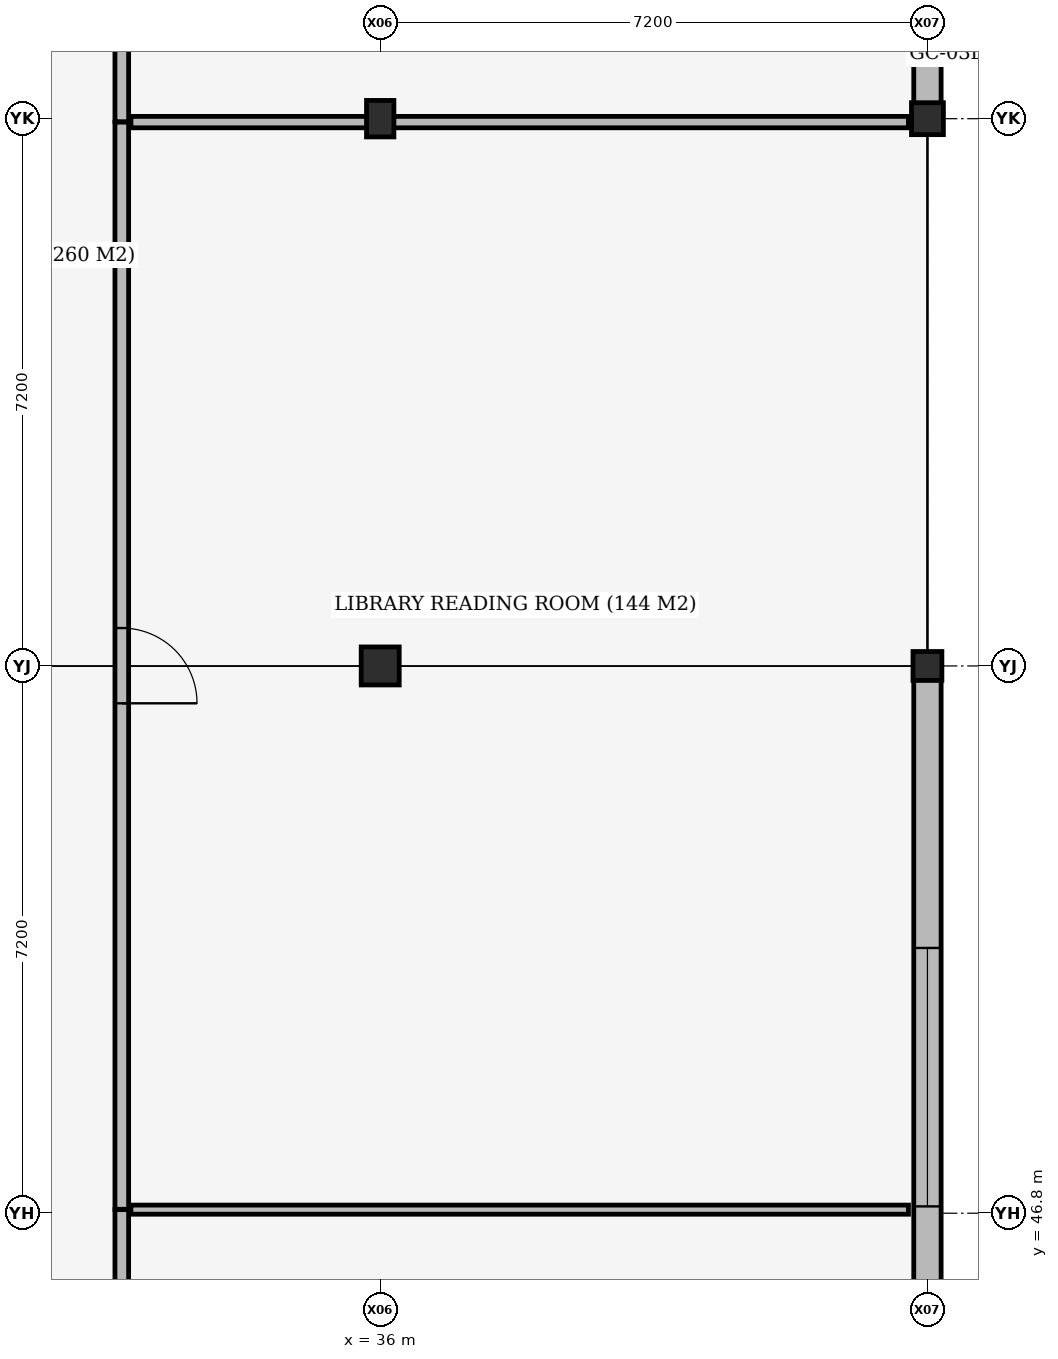
"""IFC4 building model, lengths in metres.
Left out: names, types, materials, properties, quantities, classifications, styles, units other than length and angle.
Written with IfcOpenShell. Run it as: python <this file> out.ifc"""

import sys

from ifc_helpers import new_model, si_unit, direction, frame, frame_2d, origin, origin_2d, place, context, subcontext, project, spatial, rectangle, extrude, element, fill, save


model = new_model("IFC4")
c1 = context("Model", 3, precision=1e-05, world=origin(), true_north=direction((0.0, 1.0)))
c2 = subcontext(c1, "Body", "Model", "MODEL_VIEW")
j1 = project(units=[si_unit("LENGTHUNIT", "METRE"), si_unit("PLANEANGLEUNIT", "RADIAN")], contexts=[c1])
p1 = place(None, origin())
s1 = spatial("IfcSite", under=j1, at=p1, CompositionType="ELEMENT")
p2 = place(p1, origin())
s2 = spatial("IfcBuilding", under=s1, at=p2, CompositionType="ELEMENT")
p3 = place(p2, frame((0.0, 0.0, 13.8)))
s3 = spatial("IfcBuildingStorey", under=s2, at=p3, CompositionType="ELEMENT", Elevation=13.8)
p4 = place(p3, frame((36.0, 54.0, 0.0), z_axis=(0.0, 0.0, 1.0), x_axis=(1.0, 0.0, 0.0)))
e1 = element("IfcColumn", 1, at=p4, inside=s3, PredefinedType="COLUMN", context=c2, shape_type="SweptSolid", body=[
    extrude(rectangle(XDim=0.5, YDim=0.5, at=origin_2d()), origin(), (0.0, 0.0, 1.0), 3.92),
])
p5 = place(p3, frame((36.0, 61.2, 0.0), z_axis=(0.0, 0.0, 1.0), x_axis=(1.0, 0.0, 0.0)))
e2 = element("IfcColumn", 2, at=p5, inside=s3, PredefinedType="COLUMN", context=c2, shape_type="SweptSolid", body=[
    extrude(rectangle(XDim=0.36, YDim=0.48, at=origin_2d()), origin(), (0.0, 0.0, 1.0), 3.92),
])
p6 = place(p3, frame((43.2, 54.0, 0.0), z_axis=(0.0, 0.0, 1.0), x_axis=(1.0, 0.0, 0.0)))
e3 = element("IfcColumn", 3, at=p6, inside=s3, PredefinedType="COLUMN", context=c2, shape_type="SweptSolid", body=[
    extrude(rectangle(XDim=0.38, YDim=0.38, at=origin_2d()), origin(), (0.0, 0.0, 1.0), 3.92),
])
p7 = place(p3, frame((43.2, 61.2, 0.0), z_axis=(0.0, 0.0, 1.0), x_axis=(1.0, 0.0, 0.0)))
e4 = element("IfcColumn", 4, at=p7, inside=s3, PredefinedType="COLUMN", context=c2, shape_type="SweptSolid", body=[
    extrude(rectangle(XDim=0.42, YDim=0.42, at=origin_2d()), origin(), (0.0, 0.0, 1.0), 3.92),
])
p8 = place(p3, frame((43.2, 53.818, 0.0), z_axis=(0.0, 0.0, 1.0), x_axis=(0.0, -1.0, 0.0)))
e5 = element("IfcWall", 5, at=p8, inside=s3, PredefinedType="STANDARD", context=c2, shape_type="SweptSolid", body=[
    extrude(rectangle(XDim=10.456, YDim=0.36, at=frame_2d((5.228, 0.0))), origin(), (0.0, 0.0, 1.0), 3.18),
])
p9 = place(p8, frame((3.528, 0.0, 0.9)))
e6 = element("IfcOpeningElement", 6, at=p9, cuts=e5, PredefinedType="OPENING", context=c2, shape_type="SweptSolid", body=[
    extrude(rectangle(XDim=3.4, YDim=1.5, at=frame_2d((1.7, 0.75))), frame((0.0, 0.19, 0.0), z_axis=(0.0, -1.0, 0.0), x_axis=(1.0, 0.0, 0.0)), (0.0, 0.0, 1.0), 0.38),
])
p10 = place(p3, frame((43.2, 68.178, 0.0), z_axis=(0.0, 0.0, 1.0), x_axis=(0.0, -1.0, 0.0)))
e7 = element("IfcWall", 7, at=p10, inside=s3, PredefinedType="STANDARD", context=c2, shape_type="SweptSolid", body=[
    extrude(rectangle(XDim=6.776, YDim=0.36, at=frame_2d((3.388, 0.0))), origin(), (0.0, 0.0, 1.0), 3.4),
])
p11 = place(p10, frame((1.688, 0.0, 0.9)))
e8 = element("IfcOpeningElement", 8, at=p11, cuts=e7, PredefinedType="OPENING", context=c2, shape_type="SweptSolid", body=[
    extrude(rectangle(XDim=3.4, YDim=1.5, at=frame_2d((1.7, 0.75))), frame((0.0, 0.19, 0.0), z_axis=(0.0, -1.0, 0.0), x_axis=(1.0, 0.0, 0.0)), (0.0, 0.0, 1.0), 0.38),
])
p12 = place(p3, frame((32.6, 28.42, 0.0), z_axis=(0.0, 0.0, 1.0), x_axis=(0.0, 1.0, 0.0)))
e9 = element("IfcWall", 9, at=p12, inside=s3, PredefinedType="PARTITIONING", context=c2, shape_type="SweptSolid", body=[
    extrude(rectangle(XDim=18.427, YDim=0.18, at=frame_2d((9.213, 0.0))), origin(), (0.0, 0.0, 1.0), 3.18),
])
p13 = place(p12, frame((8.723, 0.0, 0.0)))
e10 = element("IfcOpeningElement", 10, at=p13, cuts=e9, PredefinedType="OPENING", context=c2, shape_type="SweptSolid", body=[
    extrude(rectangle(XDim=0.98, YDim=2.18, at=frame_2d((0.49, 1.09))), frame((0.0, 0.1, 0.0), z_axis=(0.0, -1.0, 0.0), x_axis=(1.0, 0.0, 0.0)), (0.0, 0.0, 1.0), 0.2),
])
p14 = place(p3, frame((32.72, 46.847, 0.0), z_axis=(0.0, 0.0, 1.0), x_axis=(1.0, 0.0, 0.0)))
e11 = element("IfcWall", 11, at=p14, inside=s3, PredefinedType="PARTITIONING", context=c2, shape_type="SweptSolid", body=[
    extrude(rectangle(XDim=10.23, YDim=0.12, at=frame_2d((5.115, 0.0))), origin(), (0.0, 0.0, 1.0), 3.18),
])
p15 = place(p3, frame((32.6, 46.852, 0.0), z_axis=(0.0, 0.0, 1.0), x_axis=(0.0, 1.0, 0.0)))
e12 = element("IfcWall", 12, at=p15, inside=s3, PredefinedType="PARTITIONING", context=c2, shape_type="SweptSolid", body=[
    extrude(rectangle(XDim=14.303, YDim=0.18, at=frame_2d((7.151, 0.0))), origin(), (0.0, 0.0, 1.0), 3.28),
])
p16 = place(p15, frame((6.656, 0.0, 0.0)))
e13 = element("IfcOpeningElement", 13, at=p16, cuts=e12, PredefinedType="OPENING", context=c2, shape_type="SweptSolid", body=[
    extrude(rectangle(XDim=0.99, YDim=2.18, at=frame_2d((0.495, 1.09))), frame((0.0, 0.1, 0.0), z_axis=(0.0, -1.0, 0.0), x_axis=(1.0, 0.0, 0.0)), (0.0, 0.0, 1.0), 0.2),
])
p17 = place(p3, frame((32.72, 61.155, 0.0), z_axis=(0.0, 0.0, 1.0), x_axis=(1.0, 0.0, 0.0)))
e14 = element("IfcWall", 14, at=p17, inside=s3, PredefinedType="PARTITIONING", context=c2, shape_type="SweptSolid", body=[
    extrude(rectangle(XDim=10.23, YDim=0.15, at=frame_2d((5.115, 0.0))), origin(), (0.0, 0.0, 1.0), 3.28),
])
p18 = place(p3, frame((32.6, 61.16, 0.0), z_axis=(0.0, 0.0, 1.0), x_axis=(0.0, 1.0, 0.0)))
e15 = element("IfcWall", 15, at=p18, inside=s3, PredefinedType="PARTITIONING", context=c2, shape_type="SweptSolid", body=[
    extrude(rectangle(XDim=17.88, YDim=0.18, at=frame_2d((8.94, 0.0))), origin(), (0.0, 0.0, 1.0), 3.24),
])
p19 = place(p18, frame((8.45, 0.0, 0.0)))
e16 = element("IfcOpeningElement", 16, at=p19, cuts=e15, PredefinedType="OPENING", context=c2, shape_type="SweptSolid", body=[
    extrude(rectangle(XDim=0.98, YDim=2.18, at=frame_2d((0.49, 1.09))), frame((0.0, 0.1, 0.0), z_axis=(0.0, -1.0, 0.0), x_axis=(1.0, 0.0, 0.0)), (0.0, 0.0, 1.0), 0.2),
])
p20 = place(p9, origin())
e17 = element("IfcWindow", 17, at=p20, inside=s3, PartitioningType="DOUBLE_PANEL_VERTICAL", PredefinedType="WINDOW", context=c2, shape_type="SweptSolid", body=[
    extrude(rectangle(XDim=3.4, YDim=1.5, at=frame_2d((1.7, 0.75))), frame((0.0, 0.03, 0.0), z_axis=(0.0, -1.0, 0.0), x_axis=(1.0, 0.0, 0.0)), (0.0, 0.0, 1.0), 0.06),
])
fill(e6, e17)
p21 = place(p16, origin())
e18 = element("IfcDoor", 18, at=p21, inside=s3, OperationType="SINGLE_SWING_RIGHT", PredefinedType="DOOR", context=c2, shape_type="SweptSolid", body=[
    extrude(rectangle(XDim=0.99, YDim=2.18, at=frame_2d((0.495, 1.09))), frame((0.0, 0.025, 0.0), z_axis=(0.0, -1.0, 0.0), x_axis=(1.0, 0.0, 0.0)), (0.0, 0.0, 1.0), 0.05),
])
fill(e13, e18)
save(model, sys.argv[1])
